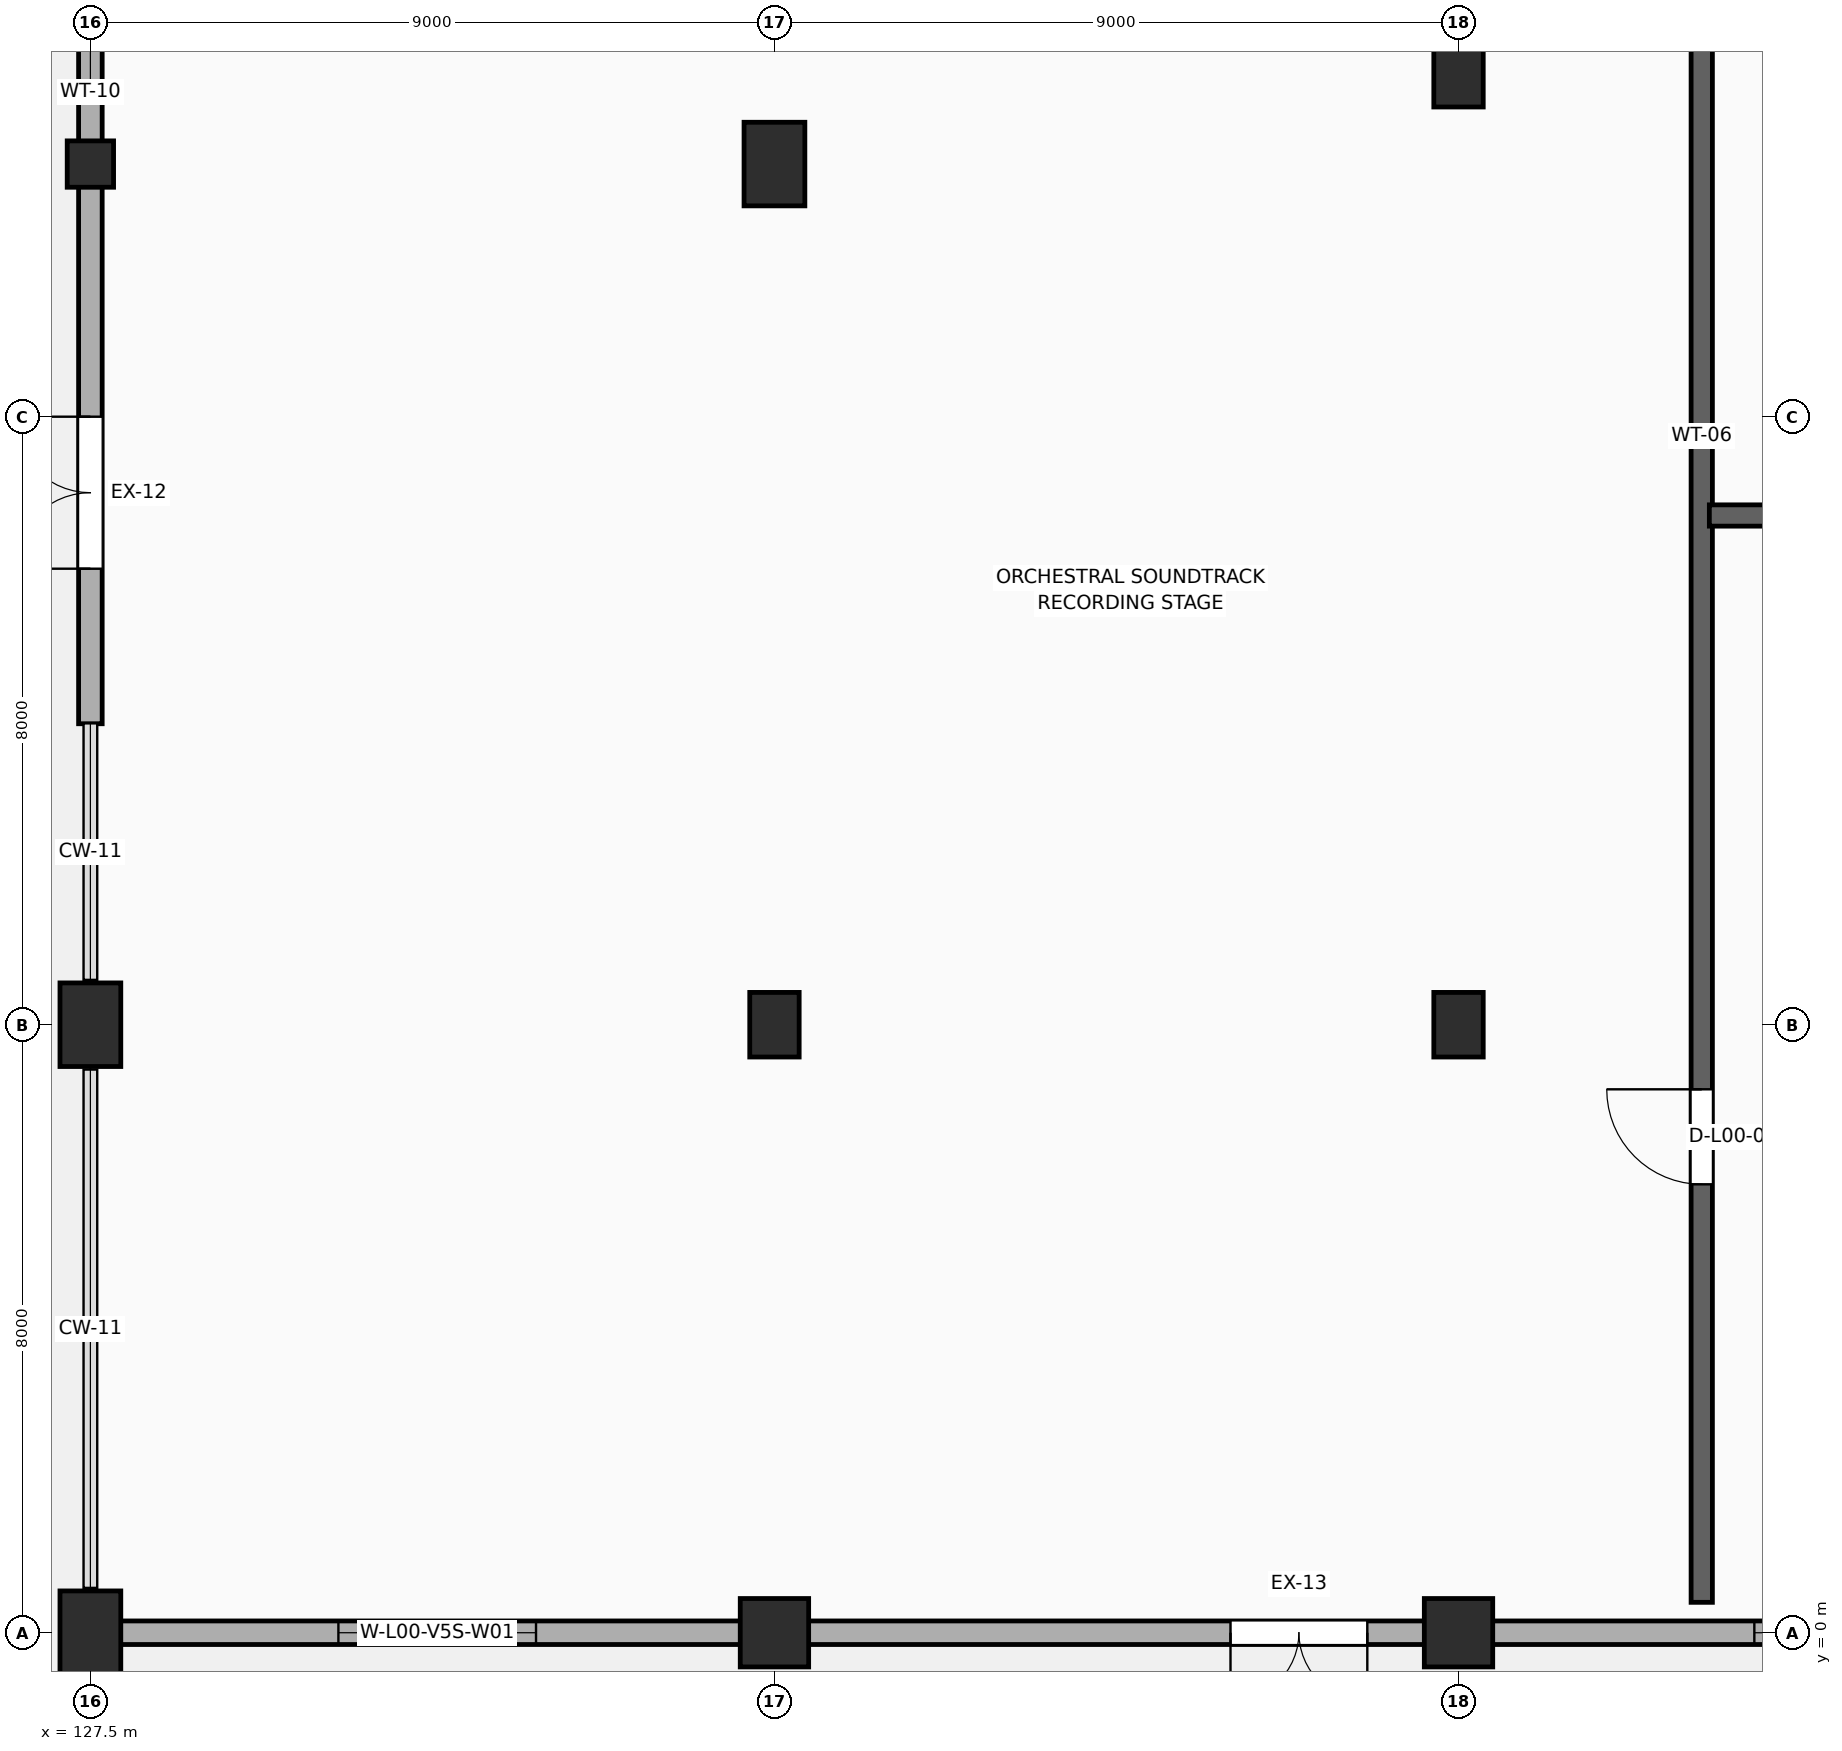
"""IFC4 building model, lengths in metres.
Left out: names, types, materials, properties, quantities, classifications, styles, units other than length and angle.
Written with IfcOpenShell. Run it as: python <this file> out.ifc"""

import sys

from ifc_helpers import new_model, si_unit, direction, frame, frame_2d, origin, origin_2d, place, context, subcontext, project, spatial, rectangle, hollow_circle, extrude, element, fill, save


model = new_model("IFC4")
c1 = context("Model", 3, precision=1e-05, world=origin(), true_north=direction((0.0, 1.0)))
c2 = subcontext(c1, "Body", "Model", "MODEL_VIEW")
j1 = project(units=[si_unit("LENGTHUNIT", "METRE"), si_unit("PLANEANGLEUNIT", "RADIAN")], contexts=[c1])
p1 = place(None, origin())
s1 = spatial("IfcSite", under=j1, at=p1, CompositionType="ELEMENT")
p2 = place(p1, origin())
s2 = spatial("IfcBuilding", under=s1, at=p2, CompositionType="ELEMENT")
p3 = place(p2, origin())
s3 = spatial("IfcBuildingStorey", under=s2, at=p3, CompositionType="ELEMENT", Elevation=0.0)
for number, where, z_axis, x_axis in (
    (1, (127.5, 0.0, 0.0), (0.0, 0.0, 1.0), (1.0, 0.0, 0.0)),
    (2, (127.5, 8.0, 0.0), (0.0, 0.0, 1.0), (1.0, 0.0, 0.0)),
):
    element("IfcColumn", number, at=place(p3, frame(where, z_axis=z_axis, x_axis=x_axis)), inside=s3, PredefinedType="COLUMN", context=c2, shape_type="SweptSolid", body=[
        extrude(rectangle(XDim=0.8, YDim=1.1, at=origin_2d()), origin(), (0.0, 0.0, 1.0), 5.14),
    ])
p4 = place(p3, frame((136.5, 0.0, 0.0), z_axis=(0.0, 0.0, 1.0), x_axis=(1.0, 0.0, 0.0)))
e3 = element("IfcColumn", 3, at=p4, inside=s3, PredefinedType="COLUMN", context=c2, shape_type="SweptSolid", body=[
    extrude(rectangle(XDim=0.9, YDim=0.9, at=origin_2d()), origin(), (0.0, 0.0, 1.0), 5.14),
])
p5 = place(p3, frame((136.5, 8.0, 0.0), z_axis=(0.0, 0.0, 1.0), x_axis=(1.0, 0.0, 0.0)))
e4 = element("IfcColumn", 4, at=p5, inside=s3, PredefinedType="COLUMN", context=c2, shape_type="SweptSolid", body=[
    extrude(rectangle(XDim=0.65, YDim=0.85, at=origin_2d()), origin(), (0.0, 0.0, 1.0), 5.14),
])
p6 = place(p3, frame((145.5, 0.0, 0.0), z_axis=(0.0, 0.0, 1.0), x_axis=(1.0, 0.0, 0.0)))
e5 = element("IfcColumn", 5, at=p6, inside=s3, PredefinedType="COLUMN", context=c2, shape_type="SweptSolid", body=[
    extrude(rectangle(XDim=0.9, YDim=0.9, at=origin_2d()), origin(), (0.0, 0.0, 1.0), 5.14),
])
for number, where, z_axis, x_axis in (
    (6, (145.5, 8.0, 0.0), (0.0, 0.0, 1.0), (1.0, 0.0, 0.0)),
    (7, (145.5, 20.5, 0.0), (0.0, 0.0, 1.0), (1.0, 0.0, 0.0)),
):
    element("IfcColumn", number, at=place(p3, frame(where, z_axis=z_axis, x_axis=x_axis)), inside=s3, PredefinedType="COLUMN", context=c2, shape_type="SweptSolid", body=[
        extrude(rectangle(XDim=0.65, YDim=0.85, at=origin_2d()), origin(), (0.0, 0.0, 1.0), 5.14),
    ])
p7 = place(p3, frame((136.5, 19.324, 0.0), z_axis=(0.0, 0.0, 1.0), x_axis=(1.0, 0.0, 0.0)))
e8 = element("IfcColumn", 8, at=p7, inside=s3, PredefinedType="COLUMN", context=c2, shape_type="SweptSolid", body=[
    extrude(rectangle(XDim=0.8, YDim=1.1, at=origin_2d()), origin(), (0.0, 0.0, 1.0), 5.14),
])
p8 = place(p3, frame((127.5, 19.324, 0.0), z_axis=(0.0, 0.0, 1.0), x_axis=(1.0, 0.0, 0.0)))
e9 = element("IfcColumn", 9, at=p8, inside=s3, PredefinedType="COLUMN", context=c2, shape_type="SweptSolid", body=[
    extrude(hollow_circle(Radius=0.305, WallThickness=0.02, at=origin_2d()), origin(), (0.0, 0.0, 1.0), 5.14),
])
p9 = place(p3, frame((127.5, 11.96, 0.0), z_axis=(0.0, 0.0, 1.0), x_axis=(0.0, 1.0, 0.0)))
e10 = element("IfcWall", 10, at=p9, inside=s3, PredefinedType="STANDARD", context=c2, shape_type="SweptSolid", body=[
    extrude(rectangle(XDim=12.04, YDim=0.31, at=frame_2d((6.02, 0.0))), origin(), (0.0, 0.0, 1.0), 4.3),
])
p10 = place(p9, frame((2.04, 0.0, 0.0)))
e11 = element("IfcOpeningElement", 11, at=p10, cuts=e10, PredefinedType="OPENING", context=c2, shape_type="SweptSolid", body=[
    extrude(rectangle(XDim=2.0, YDim=2.4, at=frame_2d((1.0, 1.2))), frame((0.0, 0.167, 0.0), z_axis=(0.0, -1.0, 0.0), x_axis=(1.0, 0.0, 0.0)), (0.0, 0.0, 1.0), 0.334),
])
p11 = place(p9, frame((8.43, 0.0, 1.2)))
e12 = element("IfcOpeningElement", 12, at=p11, cuts=e10, PredefinedType="OPENING", context=c2, shape_type="SweptSolid", body=[
    extrude(rectangle(XDim=1.2, YDim=2.2, at=frame_2d((0.6, 1.1))), frame((0.0, 0.167, 0.0), z_axis=(0.0, -1.0, 0.0), x_axis=(1.0, 0.0, 0.0)), (0.0, 0.0, 1.0), 0.334),
])
p12 = place(p3, frame((127.5, 0.0, 0.0), z_axis=(0.0, 0.0, 1.0), x_axis=(1.0, 0.0, 0.0)))
e13 = element("IfcWall", 13, at=p12, inside=s3, PredefinedType="STANDARD", context=c2, shape_type="SweptSolid", body=[
    extrude(rectangle(XDim=36.5, YDim=0.31, at=frame_2d((18.25, 0.0))), origin(), (0.0, 0.0, 1.0), 4.3),
])
p13 = place(p12, frame((15.0, 0.0, 0.0)))
e14 = element("IfcOpeningElement", 14, at=p13, cuts=e13, PredefinedType="OPENING", context=c2, shape_type="SweptSolid", body=[
    extrude(rectangle(XDim=1.8, YDim=2.3, at=frame_2d((0.9, 1.15))), frame((0.0, 0.167, 0.0), z_axis=(0.0, -1.0, 0.0), x_axis=(1.0, 0.0, 0.0)), (0.0, 0.0, 1.0), 0.334),
])
p14 = place(p12, frame((3.263, 0.0, 2.74)))
e15 = element("IfcOpeningElement", 15, at=p14, cuts=e13, PredefinedType="OPENING", context=c2, shape_type="SweptSolid", body=[
    extrude(rectangle(XDim=2.6, YDim=1.4, at=frame_2d((1.3, 0.7))), frame((0.0, 0.167, 0.0), z_axis=(0.0, -1.0, 0.0), x_axis=(1.0, 0.0, 0.0)), (0.0, 0.0, 1.0), 0.334),
])
p15 = place(p12, frame((21.892, 0.0, 2.74)))
e16 = element("IfcOpeningElement", 16, at=p15, cuts=e13, PredefinedType="OPENING", context=c2, shape_type="SweptSolid", body=[
    extrude(rectangle(XDim=2.6, YDim=1.4, at=frame_2d((1.3, 0.7))), frame((0.0, 0.167, 0.0), z_axis=(0.0, -1.0, 0.0), x_axis=(1.0, 0.0, 0.0)), (0.0, 0.0, 1.0), 0.334),
])
p16 = place(p12, frame((30.637, 0.0, 2.74)))
e17 = element("IfcOpeningElement", 17, at=p16, cuts=e13, PredefinedType="OPENING", context=c2, shape_type="SweptSolid", body=[
    extrude(rectangle(XDim=2.6, YDim=1.4, at=frame_2d((1.3, 0.7))), frame((0.0, 0.167, 0.0), z_axis=(0.0, -1.0, 0.0), x_axis=(1.0, 0.0, 0.0)), (0.0, 0.0, 1.0), 0.334),
])
p17 = place(p3, frame((148.7, 0.4, 0.0), z_axis=(0.0, 0.0, 1.0), x_axis=(0.0, 1.0, 0.0)))
e18 = element("IfcWall", 18, at=p17, inside=s3, PredefinedType="STANDARD", context=c2, shape_type="SweptSolid", body=[
    extrude(rectangle(XDim=23.3, YDim=0.28, at=frame_2d((11.65, 0.0))), origin(), (0.0, 0.0, 1.0), 5.1),
])
p18 = place(p17, frame((5.5, 0.0, 0.0)))
e19 = element("IfcOpeningElement", 19, at=p18, cuts=e18, PredefinedType="OPENING", context=c2, shape_type="SweptSolid", body=[
    extrude(rectangle(XDim=1.25, YDim=2.25, at=frame_2d((0.625, 1.125))), frame((0.0, 0.152, 0.0), z_axis=(0.0, -1.0, 0.0), x_axis=(1.0, 0.0, 0.0)), (0.0, 0.0, 1.0), 0.304),
])
p19 = place(p3, frame((148.8, 14.7, 0.0), z_axis=(0.0, 0.0, 1.0), x_axis=(1.0, 0.0, 0.0)))
e20 = element("IfcWall", 20, at=p19, inside=s3, PredefinedType="STANDARD", context=c2, shape_type="SweptSolid", body=[
    extrude(rectangle(XDim=14.8, YDim=0.28, at=frame_2d((7.4, 0.0))), origin(), (0.0, 0.0, 1.0), 5.1),
])
p20 = place(p10, origin())
e21 = element("IfcDoor", 21, at=p20, inside=s3, OperationType="DOUBLE_DOOR_SINGLE_SWING", PredefinedType="DOOR", context=c2, shape_type="SweptSolid", body=[
    extrude(rectangle(XDim=2.0, YDim=2.4, at=frame_2d((1.0, 1.2))), frame((0.0, 0.025, 0.0), z_axis=(0.0, -1.0, 0.0), x_axis=(1.0, 0.0, 0.0)), (0.0, 0.0, 1.0), 0.05),
])
fill(e11, e21)
p21 = place(p11, origin())
e22 = element("IfcWindow", 22, at=p21, inside=s3, PartitioningType="SINGLE_PANEL", PredefinedType="WINDOW", context=c2, shape_type="SweptSolid", body=[
    extrude(rectangle(XDim=1.2, YDim=2.2, at=frame_2d((0.6, 1.1))), frame((0.0, 0.03, 0.0), z_axis=(0.0, -1.0, 0.0), x_axis=(1.0, 0.0, 0.0)), (0.0, 0.0, 1.0), 0.06),
])
fill(e12, e22)
p22 = place(p13, frame((1.8, 0.0, 0.0), z_axis=(0.0, 0.0, 1.0), x_axis=(-1.0, 0.0, 0.0)))
e23 = element("IfcDoor", 23, at=p22, inside=s3, OperationType="DOUBLE_DOOR_SINGLE_SWING", PredefinedType="DOOR", context=c2, shape_type="SweptSolid", body=[
    extrude(rectangle(XDim=1.8, YDim=2.3, at=frame_2d((0.9, 1.15))), frame((0.0, 0.025, 0.0), z_axis=(0.0, -1.0, 0.0), x_axis=(1.0, 0.0, 0.0)), (0.0, 0.0, 1.0), 0.05),
])
fill(e14, e23)
p23 = place(p14, origin())
e24 = element("IfcWindow", 24, at=p23, inside=s3, PartitioningType="SINGLE_PANEL", PredefinedType="WINDOW", context=c2, shape_type="SweptSolid", body=[
    extrude(rectangle(XDim=2.6, YDim=1.4, at=frame_2d((1.3, 0.7))), frame((0.0, 0.03, 0.0), z_axis=(0.0, -1.0, 0.0), x_axis=(1.0, 0.0, 0.0)), (0.0, 0.0, 1.0), 0.06),
])
fill(e15, e24)
p24 = place(p15, origin())
e25 = element("IfcWindow", 25, at=p24, inside=s3, PartitioningType="SINGLE_PANEL", PredefinedType="WINDOW", context=c2, shape_type="SweptSolid", body=[
    extrude(rectangle(XDim=2.6, YDim=1.4, at=frame_2d((1.3, 0.7))), frame((0.0, 0.03, 0.0), z_axis=(0.0, -1.0, 0.0), x_axis=(1.0, 0.0, 0.0)), (0.0, 0.0, 1.0), 0.06),
])
fill(e16, e25)
p25 = place(p18, origin())
e26 = element("IfcDoor", 26, at=p25, inside=s3, OperationType="SINGLE_SWING_RIGHT", PredefinedType="DOOR", context=c2, shape_type="SweptSolid", body=[
    extrude(rectangle(XDim=1.25, YDim=2.25, at=frame_2d((0.625, 1.125))), frame((0.0, 0.025, 0.0), z_axis=(0.0, -1.0, 0.0), x_axis=(1.0, 0.0, 0.0)), (0.0, 0.0, 1.0), 0.05),
])
fill(e19, e26)
save(model, sys.argv[1])
